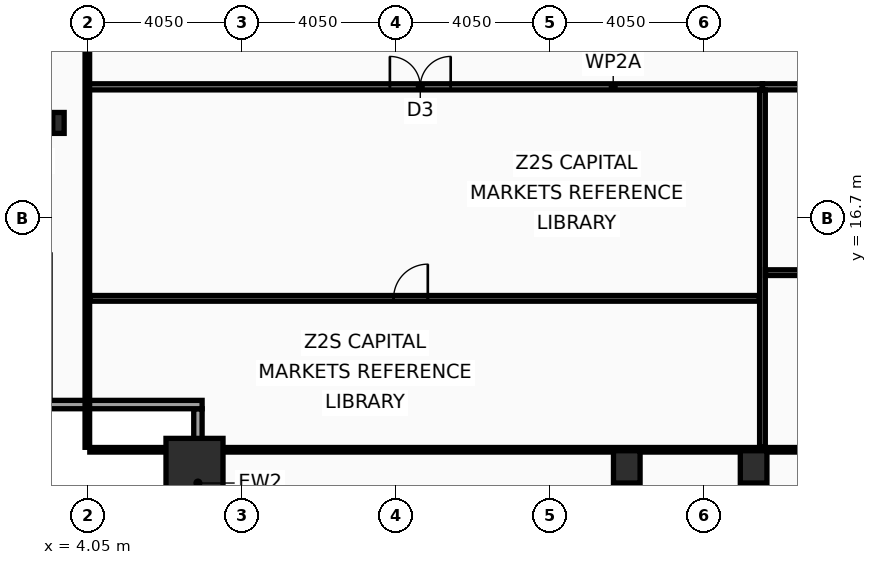
"""IFC4 building model, lengths in metres.
Left out: names, types, materials, properties, quantities, classifications, styles, units other than length and angle.
Written with IfcOpenShell. Run it as: python <this file> out.ifc"""

import sys

from ifc_helpers import new_model, si_unit, direction, frame, frame_2d, origin, origin_2d, place, context, subcontext, project, spatial, rectangle, hollow_rectangle, i_section, extrude, element, fill, save


model = new_model("IFC4")
c1 = context("Model", 3, precision=1e-05, world=origin(), true_north=direction((0.0, 1.0)))
c2 = subcontext(c1, "Body", "Model", "MODEL_VIEW")
j1 = project(units=[si_unit("LENGTHUNIT", "METRE"), si_unit("PLANEANGLEUNIT", "RADIAN")], contexts=[c1])
p1 = place(None, origin())
s1 = spatial("IfcSite", under=j1, at=p1, CompositionType="ELEMENT")
p2 = place(p1, origin())
s2 = spatial("IfcBuilding", under=s1, at=p2, CompositionType="ELEMENT")
p3 = place(p2, frame((0.0, 0.0, 121.8)))
s3 = spatial("IfcBuildingStorey", under=s2, at=p3, CompositionType="ELEMENT", Elevation=121.8)
p4 = place(p3, frame((6.85, 10.15, 0.0), z_axis=(0.0, 0.0, 1.0), x_axis=(1.0, 0.0, 0.0)))
e1 = element("IfcColumn", 1, at=p4, inside=s3, PredefinedType="COLUMN", context=c2, shape_type="SweptSolid", body=[
    extrude(hollow_rectangle(XDim=1.5, YDim=1.5, WallThickness=0.07, at=origin_2d()), origin(), (0.0, 0.0, 1.0), 3.6),
])
for number, where, z_axis, x_axis in (
    (2, (18.225, 10.15, 0.0), (0.0, 0.0, 1.0), (1.0, 0.0, 0.0)),
    (3, (21.562, 10.15, 0.0), (0.0, 0.0, 1.0), (1.0, 0.0, 0.0)),
):
    element("IfcColumn", number, at=place(p3, frame(where, z_axis=z_axis, x_axis=x_axis)), inside=s3, PredefinedType="COLUMN", context=c2, shape_type="SweptSolid", body=[
        extrude(hollow_rectangle(XDim=0.7, YDim=0.85, WallThickness=0.05, at=origin_2d()), origin(), (0.0, 0.0, 1.0), 3.6),
    ])
p5 = place(p3, frame((3.27, 19.2, 0.0), z_axis=(0.0, 0.0, 1.0), x_axis=(1.0, 0.0, 0.0)))
e4 = element("IfcColumn", 4, at=p5, inside=s3, PredefinedType="COLUMN", context=c2, shape_type="SweptSolid", body=[
    extrude(i_section(OverallWidth=0.3, OverallDepth=0.55, WebThickness=0.015, FlangeThickness=0.029, at=origin_2d()), origin(), (0.0, 0.0, 1.0), 3.6),
])
p6 = place(p3, frame((6.94, 7.77, 0.0), z_axis=(0.0, 0.0, 1.0), x_axis=(0.0, 1.0, 0.0)))
e5 = element("IfcWall", 5, at=p6, inside=s3, PredefinedType="SOLIDWALL", context=c2, shape_type="SweptSolid", body=[
    extrude(rectangle(XDim=3.91, YDim=0.22, at=frame_2d((1.955, 0.0))), origin(), (0.0, 0.0, 1.0), 2.83),
])
p7 = place(p3, frame((7.05, 11.79, 0.0), z_axis=(0.0, 0.0, 1.0), x_axis=(-1.0, 0.0, 0.0)))
e6 = element("IfcWall", 6, at=p7, inside=s3, PredefinedType="SOLIDWALL", context=c2, shape_type="SweptSolid", body=[
    extrude(rectangle(XDim=4.22, YDim=0.22, at=frame_2d((2.11, 0.0))), origin(), (0.0, 0.0, 1.0), 2.83),
])
p8 = place(p3, frame((4.03, 20.15, 0.0), z_axis=(0.0, 0.0, 1.0), x_axis=(1.0, 0.0, 0.0)))
e7 = element("IfcWall", 7, at=p8, inside=s3, PredefinedType="PARTITIONING", context=c2, shape_type="SweptSolid", body=[
    extrude(rectangle(XDim=17.765, YDim=0.16, at=frame_2d((8.883, 0.0))), origin(), (0.0, 0.0, 1.0), 2.73),
])
p9 = place(p8, frame((7.961, 0.0, 0.0)))
e8 = element("IfcOpeningElement", 8, at=p9, cuts=e7, PredefinedType="OPENING", context=c2, shape_type="SweptSolid", body=[
    extrude(rectangle(XDim=1.6, YDim=2.15, at=frame_2d((0.8, 1.075))), frame((0.0, 0.09, 0.0), z_axis=(0.0, -1.0, 0.0), x_axis=(1.0, 0.0, 0.0)), (0.0, 0.0, 1.0), 0.18),
])
p10 = place(p3, frame((4.095, 14.584, 0.0), z_axis=(0.0, 0.0, 1.0), x_axis=(1.0, 0.0, 0.0)))
e9 = element("IfcWall", 9, at=p10, inside=s3, PredefinedType="PARTITIONING", context=c2, shape_type="SweptSolid", body=[
    extrude(rectangle(XDim=17.62, YDim=0.15, at=frame_2d((8.81, 0.0))), origin(), (0.0, 0.0, 1.0), 2.73),
])
p11 = place(p10, frame((7.994, 0.0, 0.0)))
e10 = element("IfcOpeningElement", 10, at=p11, cuts=e9, PredefinedType="OPENING", context=c2, shape_type="SweptSolid", body=[
    extrude(rectangle(XDim=0.9, YDim=2.05, at=frame_2d((0.45, 1.025))), frame((0.0, 0.085, 0.0), z_axis=(0.0, -1.0, 0.0), x_axis=(1.0, 0.0, 0.0)), (0.0, 0.0, 1.0), 0.17),
])
p12 = place(p3, frame((21.795, 20.15, 0.0), z_axis=(0.0, 0.0, 1.0), x_axis=(1.0, 0.0, 0.0)))
e11 = element("IfcWall", 11, at=p12, inside=s3, PredefinedType="PARTITIONING", context=c2, shape_type="SweptSolid", body=[
    extrude(rectangle(XDim=14.129, YDim=0.16, at=frame_2d((7.064, 0.0))), origin(), (0.0, 0.0, 1.0), 2.73),
])
p13 = place(p12, frame((6.434, 0.0, 0.0)))
e12 = element("IfcOpeningElement", 12, at=p13, cuts=e11, PredefinedType="OPENING", context=c2, shape_type="SweptSolid", body=[
    extrude(rectangle(XDim=1.6, YDim=2.15, at=frame_2d((0.8, 1.075))), frame((0.0, 0.09, 0.0), z_axis=(0.0, -1.0, 0.0), x_axis=(1.0, 0.0, 0.0)), (0.0, 0.0, 1.0), 0.18),
])
p14 = place(p3, frame((21.795, 10.665, 0.0), z_axis=(0.0, 0.0, 1.0), x_axis=(0.0, 1.0, 0.0)))
e13 = element("IfcWall", 13, at=p14, inside=s3, PredefinedType="PARTITIONING", context=c2, shape_type="SweptSolid", body=[
    extrude(rectangle(XDim=9.4, YDim=0.15, at=frame_2d((4.7, 0.0))), origin(), (0.0, 0.0, 1.0), 2.88),
])
p15 = place(p3, frame((21.875, 15.261, 0.0), z_axis=(0.0, 0.0, 1.0), x_axis=(1.0, 0.0, 0.0)))
e14 = element("IfcWall", 14, at=p15, inside=s3, PredefinedType="PARTITIONING", context=c2, shape_type="SweptSolid", body=[
    extrude(rectangle(XDim=13.969, YDim=0.15, at=frame_2d((6.984, 0.0))), origin(), (0.0, 0.0, 1.0), 2.73),
])
p16 = place(p15, frame((6.358, 0.0, 0.0)))
e15 = element("IfcOpeningElement", 15, at=p16, cuts=e14, PredefinedType="OPENING", context=c2, shape_type="SweptSolid", body=[
    extrude(rectangle(XDim=0.9, YDim=2.05, at=frame_2d((0.45, 1.025))), frame((0.0, 0.085, 0.0), z_axis=(0.0, -1.0, 0.0), x_axis=(1.0, 0.0, 0.0)), (0.0, 0.0, 1.0), 0.17),
])
p17 = place(p3, frame((4.03, 10.665, 0.0), z_axis=(0.0, 0.0, 1.0), x_axis=(0.0, 1.0, 0.0)))
e16 = element("IfcWall", 16, at=p17, inside=s3, PredefinedType="PARTITIONING", context=c2, shape_type="SweptSolid", body=[
    extrude(rectangle(XDim=42.11, YDim=0.12, at=frame_2d((21.055, 0.0))), origin(), (0.0, 0.0, 1.0), 2.73),
])
p18 = place(p3, frame((4.095, 10.6, 0.0), z_axis=(0.0, 0.0, 1.0), x_axis=(1.0, 0.0, 0.0)))
e17 = element("IfcWall", 17, at=p18, inside=s3, PredefinedType="PARTITIONING", context=c2, shape_type="SweptSolid", body=[
    extrude(rectangle(XDim=64.71, YDim=0.12, at=frame_2d((32.355, 0.0))), origin(), (0.0, 0.0, 1.0), 2.73),
])
p19 = place(p9, origin())
e18 = element("IfcDoor", 18, at=p19, inside=s3, OperationType="DOUBLE_DOOR_SINGLE_SWING", PredefinedType="DOOR", context=c2, shape_type="SweptSolid", body=[
    extrude(rectangle(XDim=1.6, YDim=2.15, at=frame_2d((0.8, 1.075))), frame((0.0, 0.025, 0.0), z_axis=(0.0, -1.0, 0.0), x_axis=(1.0, 0.0, 0.0)), (0.0, 0.0, 1.0), 0.05),
])
fill(e8, e18)
p20 = place(p11, origin())
e19 = element("IfcDoor", 19, at=p20, inside=s3, OperationType="SINGLE_SWING_RIGHT", PredefinedType="DOOR", context=c2, shape_type="SweptSolid", body=[
    extrude(rectangle(XDim=0.9, YDim=2.05, at=frame_2d((0.45, 1.025))), frame((0.0, 0.025, 0.0), z_axis=(0.0, -1.0, 0.0), x_axis=(1.0, 0.0, 0.0)), (0.0, 0.0, 1.0), 0.05),
])
fill(e10, e19)
save(model, sys.argv[1])
